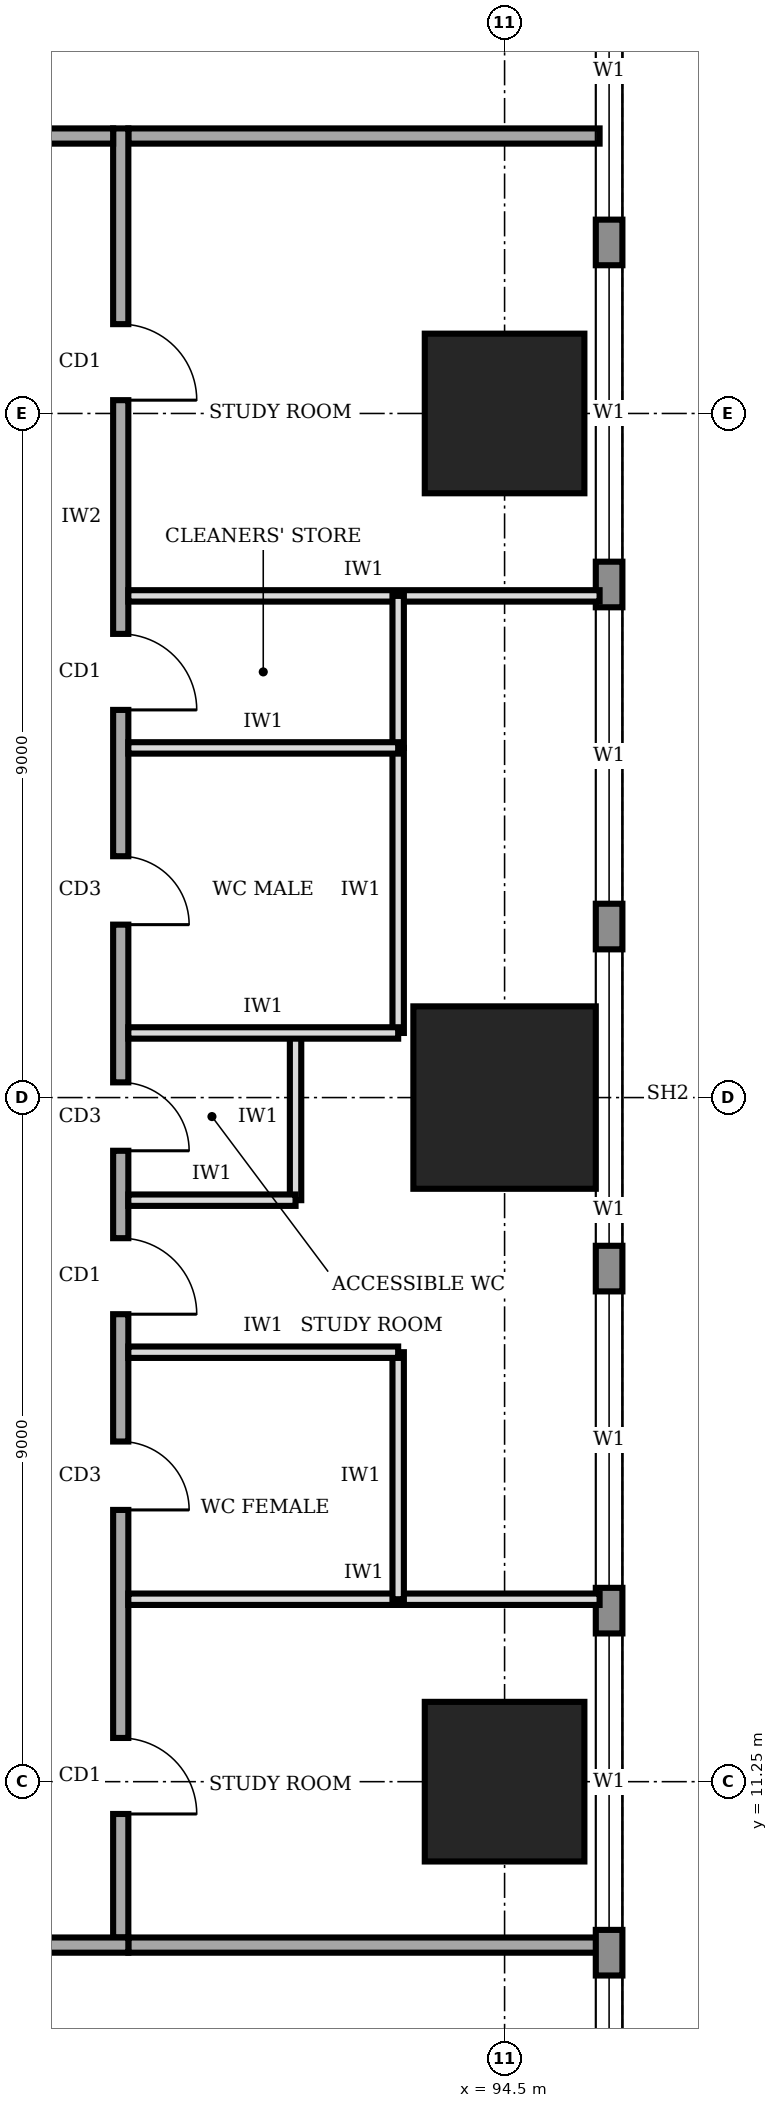
"""IFC4 building model, lengths in metres.
Left out: names, types, materials, properties, quantities, classifications, styles, units other than length and angle.
Written with IfcOpenShell. Run it as: python <this file> out.ifc"""

import sys

from ifc_helpers import new_model, si_unit, direction, frame, frame_2d, origin, origin_2d, place, context, subcontext, project, spatial, rectangle, extrude, element, fill, save


model = new_model("IFC4")
c1 = context("Model", 3, precision=1e-05, world=origin(), true_north=direction((0.0, 1.0)))
c2 = subcontext(c1, "Body", "Model", "MODEL_VIEW")
j1 = project(units=[si_unit("LENGTHUNIT", "METRE"), si_unit("PLANEANGLEUNIT", "RADIAN")], contexts=[c1])
p1 = place(None, origin())
s1 = spatial("IfcSite", under=j1, at=p1, CompositionType="ELEMENT")
p2 = place(p1, origin())
s2 = spatial("IfcBuilding", under=s1, at=p2, CompositionType="ELEMENT")
p3 = place(p2, frame((0.0, 0.0, 113.0)))
s3 = spatial("IfcBuildingStorey", under=s2, at=p3, CompositionType="ELEMENT", Elevation=113.0)
p4 = place(p3, frame((94.5, 11.25, 0.0), z_axis=(0.0, 0.0, 1.0), x_axis=(1.0, 0.0, 0.0)))
e1 = element("IfcColumn", 1, at=p4, inside=s3, PredefinedType="COLUMN", context=c2, shape_type="SweptSolid", body=[
    extrude(rectangle(XDim=2.1, YDim=2.1, at=origin_2d()), origin(), (0.0, 0.0, 1.0), 4.0),
])
p5 = place(p3, frame((94.5, 20.25, 0.0), z_axis=(0.0, 0.0, 1.0), x_axis=(1.0, 0.0, 0.0)))
e2 = element("IfcColumn", 2, at=p5, inside=s3, PredefinedType="COLUMN", context=c2, shape_type="SweptSolid", body=[
    extrude(rectangle(XDim=2.4, YDim=2.4, at=origin_2d()), origin(), (0.0, 0.0, 1.0), 4.0),
])
p6 = place(p3, frame((94.5, 29.25, 0.0), z_axis=(0.0, 0.0, 1.0), x_axis=(1.0, 0.0, 0.0)))
e3 = element("IfcColumn", 3, at=p6, inside=s3, PredefinedType="COLUMN", context=c2, shape_type="SweptSolid", body=[
    extrude(rectangle(XDim=2.1, YDim=2.1, at=origin_2d()), origin(), (0.0, 0.0, 1.0), 4.0),
])
p7 = place(p3, frame((95.875, 3.32, 0.0), z_axis=(0.0, 0.0, 1.0), x_axis=(0.0, 1.0, 0.0)))
e4 = element("IfcWall", 4, at=p7, inside=s3, PredefinedType="STANDARD", context=c2, shape_type="SweptSolid", body=[
    extrude(rectangle(XDim=33.96, YDim=0.35, at=frame_2d((16.98, 0.0))), origin(), (0.0, 0.0, 1.0), 3.75),
])
p8 = place(p7, frame((1.48, 0.0, 0.9)))
e5 = element("IfcOpeningElement", 5, at=p8, cuts=e4, PredefinedType="OPENING", context=c2, shape_type="SweptSolid", body=[
    extrude(rectangle(XDim=3.9, YDim=2.2, at=frame_2d((1.95, 1.1))), frame((0.0, 0.185, 0.0), z_axis=(0.0, -1.0, 0.0), x_axis=(1.0, 0.0, 0.0)), (0.0, 0.0, 1.0), 0.37),
])
p9 = place(p7, frame((5.98, 0.0, 0.9)))
e6 = element("IfcOpeningElement", 6, at=p9, cuts=e4, PredefinedType="OPENING", context=c2, shape_type="SweptSolid", body=[
    extrude(rectangle(XDim=3.9, YDim=2.2, at=frame_2d((1.95, 1.1))), frame((0.0, 0.185, 0.0), z_axis=(0.0, -1.0, 0.0), x_axis=(1.0, 0.0, 0.0)), (0.0, 0.0, 1.0), 0.37),
])
p10 = place(p7, frame((10.48, 0.0, 0.9)))
e7 = element("IfcOpeningElement", 7, at=p10, cuts=e4, PredefinedType="OPENING", context=c2, shape_type="SweptSolid", body=[
    extrude(rectangle(XDim=3.9, YDim=2.2, at=frame_2d((1.95, 1.1))), frame((0.0, 0.185, 0.0), z_axis=(0.0, -1.0, 0.0), x_axis=(1.0, 0.0, 0.0)), (0.0, 0.0, 1.0), 0.37),
])
p11 = place(p7, frame((14.98, 0.0, 0.9)))
e8 = element("IfcOpeningElement", 8, at=p11, cuts=e4, PredefinedType="OPENING", context=c2, shape_type="SweptSolid", body=[
    extrude(rectangle(XDim=3.9, YDim=2.2, at=frame_2d((1.95, 1.1))), frame((0.0, 0.185, 0.0), z_axis=(0.0, -1.0, 0.0), x_axis=(1.0, 0.0, 0.0)), (0.0, 0.0, 1.0), 0.37),
])
p12 = place(p7, frame((19.48, 0.0, 0.9)))
e9 = element("IfcOpeningElement", 9, at=p12, cuts=e4, PredefinedType="OPENING", context=c2, shape_type="SweptSolid", body=[
    extrude(rectangle(XDim=3.9, YDim=2.2, at=frame_2d((1.95, 1.1))), frame((0.0, 0.185, 0.0), z_axis=(0.0, -1.0, 0.0), x_axis=(1.0, 0.0, 0.0)), (0.0, 0.0, 1.0), 0.37),
])
p13 = place(p7, frame((23.98, 0.0, 0.9)))
e10 = element("IfcOpeningElement", 10, at=p13, cuts=e4, PredefinedType="OPENING", context=c2, shape_type="SweptSolid", body=[
    extrude(rectangle(XDim=3.9, YDim=2.2, at=frame_2d((1.95, 1.1))), frame((0.0, 0.185, 0.0), z_axis=(0.0, -1.0, 0.0), x_axis=(1.0, 0.0, 0.0)), (0.0, 0.0, 1.0), 0.37),
])
p14 = place(p7, frame((28.48, 0.0, 0.9)))
e11 = element("IfcOpeningElement", 11, at=p14, cuts=e4, PredefinedType="OPENING", context=c2, shape_type="SweptSolid", body=[
    extrude(rectangle(XDim=3.9, YDim=2.2, at=frame_2d((1.95, 1.1))), frame((0.0, 0.185, 0.0), z_axis=(0.0, -1.0, 0.0), x_axis=(1.0, 0.0, 0.0)), (0.0, 0.0, 1.0), 0.37),
])
p15 = place(p3, frame((72.65, 9.1, 0.0), z_axis=(0.0, 0.0, 1.0), x_axis=(1.0, 0.0, 0.0)))
e12 = element("IfcWall", 12, at=p15, inside=s3, PredefinedType="SOLIDWALL", context=c2, shape_type="SweptSolid", body=[
    extrude(rectangle(XDim=16.9, YDim=0.2, at=frame_2d((8.45, 0.0))), origin(), (0.0, 0.0, 1.0), 3.75),
])
p16 = place(p15, frame((1.325, 0.0, 0.0)))
e13 = element("IfcOpeningElement", 13, at=p16, cuts=e12, PredefinedType="OPENING", context=c2, shape_type="SweptSolid", body=[
    extrude(rectangle(XDim=1.0, YDim=2.1, at=frame_2d((0.5, 1.05))), frame((0.0, 0.11, 0.0), z_axis=(0.0, -1.0, 0.0), x_axis=(1.0, 0.0, 0.0)), (0.0, 0.0, 1.0), 0.22),
])
p17 = place(p15, frame((7.85, 0.0, 0.0)))
e14 = element("IfcOpeningElement", 14, at=p17, cuts=e12, PredefinedType="OPENING", context=c2, shape_type="SweptSolid", body=[
    extrude(rectangle(XDim=1.0, YDim=2.1, at=frame_2d((0.5, 1.05))), frame((0.0, 0.11, 0.0), z_axis=(0.0, -1.0, 0.0), x_axis=(1.0, 0.0, 0.0)), (0.0, 0.0, 1.0), 0.22),
])
p18 = place(p15, frame((14.375, 0.0, 0.0)))
e15 = element("IfcOpeningElement", 15, at=p18, cuts=e12, PredefinedType="OPENING", context=c2, shape_type="SweptSolid", body=[
    extrude(rectangle(XDim=1.0, YDim=2.1, at=frame_2d((0.5, 1.05))), frame((0.0, 0.11, 0.0), z_axis=(0.0, -1.0, 0.0), x_axis=(1.0, 0.0, 0.0)), (0.0, 0.0, 1.0), 0.22),
])
p19 = place(p3, frame((89.45, 9.2, 0.0), z_axis=(0.0, 0.0, 1.0), x_axis=(0.0, 1.0, 0.0)))
e16 = element("IfcWall", 16, at=p19, inside=s3, PredefinedType="SOLIDWALL", context=c2, shape_type="SweptSolid", body=[
    extrude(rectangle(XDim=23.8, YDim=0.2, at=frame_2d((11.9, 0.0))), origin(), (0.0, 0.0, 1.0), 3.75),
])
p20 = place(p19, frame((1.625, 0.0, 0.0)))
e17 = element("IfcOpeningElement", 17, at=p20, cuts=e16, PredefinedType="OPENING", context=c2, shape_type="SweptSolid", body=[
    extrude(rectangle(XDim=1.0, YDim=2.1, at=frame_2d((0.5, 1.05))), frame((0.0, 0.11, 0.0), z_axis=(0.0, -1.0, 0.0), x_axis=(1.0, 0.0, 0.0)), (0.0, 0.0, 1.0), 0.22),
])
p21 = place(p19, frame((5.625, 0.0, 0.0)))
e18 = element("IfcOpeningElement", 18, at=p21, cuts=e16, PredefinedType="OPENING", context=c2, shape_type="SweptSolid", body=[
    extrude(rectangle(XDim=0.9, YDim=2.1, at=frame_2d((0.45, 1.05))), frame((0.0, 0.11, 0.0), z_axis=(0.0, -1.0, 0.0), x_axis=(1.0, 0.0, 0.0)), (0.0, 0.0, 1.0), 0.22),
])
p22 = place(p19, frame((10.35, 0.0, 0.0)))
e19 = element("IfcOpeningElement", 19, at=p22, cuts=e16, PredefinedType="OPENING", context=c2, shape_type="SweptSolid", body=[
    extrude(rectangle(XDim=0.9, YDim=2.1, at=frame_2d((0.45, 1.05))), frame((0.0, 0.11, 0.0), z_axis=(0.0, -1.0, 0.0), x_axis=(1.0, 0.0, 0.0)), (0.0, 0.0, 1.0), 0.22),
])
p23 = place(p19, frame((13.325, 0.0, 0.0)))
e20 = element("IfcOpeningElement", 20, at=p23, cuts=e16, PredefinedType="OPENING", context=c2, shape_type="SweptSolid", body=[
    extrude(rectangle(XDim=0.9, YDim=2.1, at=frame_2d((0.45, 1.05))), frame((0.0, 0.11, 0.0), z_axis=(0.0, -1.0, 0.0), x_axis=(1.0, 0.0, 0.0)), (0.0, 0.0, 1.0), 0.22),
])
p24 = place(p19, frame((16.15, 0.0, 0.0)))
e21 = element("IfcOpeningElement", 21, at=p24, cuts=e16, PredefinedType="OPENING", context=c2, shape_type="SweptSolid", body=[
    extrude(rectangle(XDim=1.0, YDim=2.1, at=frame_2d((0.5, 1.05))), frame((0.0, 0.11, 0.0), z_axis=(0.0, -1.0, 0.0), x_axis=(1.0, 0.0, 0.0)), (0.0, 0.0, 1.0), 0.22),
])
p25 = place(p19, frame((8.2, 0.0, 0.0)))
e22 = element("IfcOpeningElement", 22, at=p25, cuts=e16, PredefinedType="OPENING", context=c2, shape_type="SweptSolid", body=[
    extrude(rectangle(XDim=1.0, YDim=2.1, at=frame_2d((0.5, 1.05))), frame((0.0, 0.11, 0.0), z_axis=(0.0, -1.0, 0.0), x_axis=(1.0, 0.0, 0.0)), (0.0, 0.0, 1.0), 0.22),
])
p26 = place(p19, frame((20.225, 0.0, 0.0)))
e23 = element("IfcOpeningElement", 23, at=p26, cuts=e16, PredefinedType="OPENING", context=c2, shape_type="SweptSolid", body=[
    extrude(rectangle(XDim=1.0, YDim=2.1, at=frame_2d((0.5, 1.05))), frame((0.0, 0.11, 0.0), z_axis=(0.0, -1.0, 0.0), x_axis=(1.0, 0.0, 0.0)), (0.0, 0.0, 1.0), 0.22),
])
p27 = place(p3, frame((89.35, 32.9, 0.0), z_axis=(0.0, 0.0, 1.0), x_axis=(-1.0, 0.0, 0.0)))
e24 = element("IfcWall", 24, at=p27, inside=s3, PredefinedType="SOLIDWALL", context=c2, shape_type="SweptSolid", body=[
    extrude(rectangle(XDim=16.9, YDim=0.2, at=frame_2d((8.45, 0.0))), origin(), (0.0, 0.0, 1.0), 3.75),
])
p28 = place(p27, frame((14.375, 0.0, 0.0)))
e25 = element("IfcOpeningElement", 25, at=p28, cuts=e24, PredefinedType="OPENING", context=c2, shape_type="SweptSolid", body=[
    extrude(rectangle(XDim=1.0, YDim=2.1, at=frame_2d((0.5, 1.05))), frame((0.0, 0.11, 0.0), z_axis=(0.0, -1.0, 0.0), x_axis=(1.0, 0.0, 0.0)), (0.0, 0.0, 1.0), 0.22),
])
p29 = place(p27, frame((7.85, 0.0, 0.0)))
e26 = element("IfcOpeningElement", 26, at=p29, cuts=e24, PredefinedType="OPENING", context=c2, shape_type="SweptSolid", body=[
    extrude(rectangle(XDim=1.0, YDim=2.1, at=frame_2d((0.5, 1.05))), frame((0.0, 0.11, 0.0), z_axis=(0.0, -1.0, 0.0), x_axis=(1.0, 0.0, 0.0)), (0.0, 0.0, 1.0), 0.22),
])
p30 = place(p27, frame((1.325, 0.0, 0.0)))
e27 = element("IfcOpeningElement", 27, at=p30, cuts=e24, PredefinedType="OPENING", context=c2, shape_type="SweptSolid", body=[
    extrude(rectangle(XDim=1.0, YDim=2.1, at=frame_2d((0.5, 1.05))), frame((0.0, 0.11, 0.0), z_axis=(0.0, -1.0, 0.0), x_axis=(1.0, 0.0, 0.0)), (0.0, 0.0, 1.0), 0.22),
])
for number, where, z_axis, x_axis in (
    (28, (89.55, 9.1, 0.0), (0.0, 0.0, 1.0), (1.0, 0.0, 0.0)),
    (29, (89.55, 32.9, 0.0), (0.0, 0.0, 1.0), (1.0, 0.0, 0.0)),
):
    element("IfcWall", number, at=place(p3, frame(where, z_axis=z_axis, x_axis=x_axis)), inside=s3, PredefinedType="SOLIDWALL", context=c2, shape_type="SweptSolid", body=[
        extrude(rectangle(XDim=6.2, YDim=0.2, at=frame_2d((3.1, 0.0))), origin(), (0.0, 0.0, 1.0), 3.75),
    ])
for number, where, z_axis, x_axis in (
    (30, (89.55, 13.65, 0.0), (0.0, 0.0, 1.0), (1.0, 0.0, 0.0)),
    (31, (89.55, 26.85, 0.0), (0.0, 0.0, 1.0), (1.0, 0.0, 0.0)),
):
    element("IfcWall", number, at=place(p3, frame(where, z_axis=z_axis, x_axis=x_axis)), inside=s3, PredefinedType="PARTITIONING", context=c2, shape_type="SweptSolid", body=[
        extrude(rectangle(XDim=6.2, YDim=0.15, at=frame_2d((3.1, 0.0))), origin(), (0.0, 0.0, 1.0), 3.75),
    ])
p31 = place(p3, frame((89.55, 16.9, 0.0), z_axis=(0.0, 0.0, 1.0), x_axis=(1.0, 0.0, 0.0)))
e32 = element("IfcWall", 32, at=p31, inside=s3, PredefinedType="PARTITIONING", context=c2, shape_type="SweptSolid", body=[
    extrude(rectangle(XDim=3.55, YDim=0.15, at=frame_2d((1.775, 0.0))), origin(), (0.0, 0.0, 1.0), 3.75),
])
p32 = place(p3, frame((89.55, 18.9, 0.0), z_axis=(0.0, 0.0, 1.0), x_axis=(1.0, 0.0, 0.0)))
e33 = element("IfcWall", 33, at=p32, inside=s3, PredefinedType="PARTITIONING", context=c2, shape_type="SweptSolid", body=[
    extrude(rectangle(XDim=2.2, YDim=0.15, at=frame_2d((1.1, 0.0))), origin(), (0.0, 0.0, 1.0), 3.75),
])
p33 = place(p3, frame((89.55, 21.1, 0.0), z_axis=(0.0, 0.0, 1.0), x_axis=(1.0, 0.0, 0.0)))
e34 = element("IfcWall", 34, at=p33, inside=s3, PredefinedType="PARTITIONING", context=c2, shape_type="SweptSolid", body=[
    extrude(rectangle(XDim=3.55, YDim=0.15, at=frame_2d((1.775, 0.0))), origin(), (0.0, 0.0, 1.0), 2.85),
])
p34 = place(p3, frame((89.55, 24.85, 0.0), z_axis=(0.0, 0.0, 1.0), x_axis=(1.0, 0.0, 0.0)))
e35 = element("IfcWall", 35, at=p34, inside=s3, PredefinedType="PARTITIONING", context=c2, shape_type="SweptSolid", body=[
    extrude(rectangle(XDim=3.55, YDim=0.15, at=frame_2d((1.775, 0.0))), origin(), (0.0, 0.0, 1.0), 3.75),
])
p35 = place(p3, frame((93.1, 13.65, 0.0), z_axis=(0.0, 0.0, 1.0), x_axis=(0.0, 1.0, 0.0)))
e36 = element("IfcWall", 36, at=p35, inside=s3, PredefinedType="PARTITIONING", context=c2, shape_type="SweptSolid", body=[
    extrude(rectangle(XDim=3.25, YDim=0.15, at=frame_2d((1.625, 0.0))), origin(), (0.0, 0.0, 1.0), 3.75),
])
p36 = place(p3, frame((91.75, 18.9, 0.0), z_axis=(0.0, 0.0, 1.0), x_axis=(0.0, 1.0, 0.0)))
e37 = element("IfcWall", 37, at=p36, inside=s3, PredefinedType="PARTITIONING", context=c2, shape_type="SweptSolid", body=[
    extrude(rectangle(XDim=2.2, YDim=0.15, at=frame_2d((1.1, 0.0))), origin(), (0.0, 0.0, 1.0), 3.75),
])
p37 = place(p3, frame((93.1, 21.1, 0.0), z_axis=(0.0, 0.0, 1.0), x_axis=(0.0, 1.0, 0.0)))
e38 = element("IfcWall", 38, at=p37, inside=s3, PredefinedType="PARTITIONING", context=c2, shape_type="SweptSolid", body=[
    extrude(rectangle(XDim=3.75, YDim=0.15, at=frame_2d((1.875, 0.0))), origin(), (0.0, 0.0, 1.0), 3.75),
])
p38 = place(p3, frame((93.1, 24.85, 0.0), z_axis=(0.0, 0.0, 1.0), x_axis=(0.0, 1.0, 0.0)))
e39 = element("IfcWall", 39, at=p38, inside=s3, PredefinedType="PARTITIONING", context=c2, shape_type="SweptSolid", body=[
    extrude(rectangle(XDim=2.0, YDim=0.15, at=frame_2d((1.0, 0.0))), origin(), (0.0, 0.0, 1.0), 3.75),
])
p39 = place(p8, origin())
e40 = element("IfcWindow", 40, at=p39, inside=s3, PartitioningType="SINGLE_PANEL", PredefinedType="WINDOW", context=c2, shape_type="SweptSolid", body=[
    extrude(rectangle(XDim=3.9, YDim=2.2, at=frame_2d((1.95, 1.1))), frame((0.0, 0.03, 0.0), z_axis=(0.0, -1.0, 0.0), x_axis=(1.0, 0.0, 0.0)), (0.0, 0.0, 1.0), 0.06),
])
fill(e5, e40)
p40 = place(p9, origin())
e41 = element("IfcWindow", 41, at=p40, inside=s3, PartitioningType="SINGLE_PANEL", PredefinedType="WINDOW", context=c2, shape_type="SweptSolid", body=[
    extrude(rectangle(XDim=3.9, YDim=2.2, at=frame_2d((1.95, 1.1))), frame((0.0, 0.03, 0.0), z_axis=(0.0, -1.0, 0.0), x_axis=(1.0, 0.0, 0.0)), (0.0, 0.0, 1.0), 0.06),
])
fill(e6, e41)
p41 = place(p10, origin())
e42 = element("IfcWindow", 42, at=p41, inside=s3, PartitioningType="SINGLE_PANEL", PredefinedType="WINDOW", context=c2, shape_type="SweptSolid", body=[
    extrude(rectangle(XDim=3.9, YDim=2.2, at=frame_2d((1.95, 1.1))), frame((0.0, 0.03, 0.0), z_axis=(0.0, -1.0, 0.0), x_axis=(1.0, 0.0, 0.0)), (0.0, 0.0, 1.0), 0.06),
])
fill(e7, e42)
p42 = place(p11, origin())
e43 = element("IfcWindow", 43, at=p42, inside=s3, PartitioningType="SINGLE_PANEL", PredefinedType="WINDOW", context=c2, shape_type="SweptSolid", body=[
    extrude(rectangle(XDim=3.9, YDim=2.2, at=frame_2d((1.95, 1.1))), frame((0.0, 0.03, 0.0), z_axis=(0.0, -1.0, 0.0), x_axis=(1.0, 0.0, 0.0)), (0.0, 0.0, 1.0), 0.06),
])
fill(e8, e43)
p43 = place(p12, origin())
e44 = element("IfcWindow", 44, at=p43, inside=s3, PartitioningType="SINGLE_PANEL", PredefinedType="WINDOW", context=c2, shape_type="SweptSolid", body=[
    extrude(rectangle(XDim=3.9, YDim=2.2, at=frame_2d((1.95, 1.1))), frame((0.0, 0.03, 0.0), z_axis=(0.0, -1.0, 0.0), x_axis=(1.0, 0.0, 0.0)), (0.0, 0.0, 1.0), 0.06),
])
fill(e9, e44)
p44 = place(p13, origin())
e45 = element("IfcWindow", 45, at=p44, inside=s3, PartitioningType="SINGLE_PANEL", PredefinedType="WINDOW", context=c2, shape_type="SweptSolid", body=[
    extrude(rectangle(XDim=3.9, YDim=2.2, at=frame_2d((1.95, 1.1))), frame((0.0, 0.03, 0.0), z_axis=(0.0, -1.0, 0.0), x_axis=(1.0, 0.0, 0.0)), (0.0, 0.0, 1.0), 0.06),
])
fill(e10, e45)
p45 = place(p14, origin())
e46 = element("IfcWindow", 46, at=p45, inside=s3, PartitioningType="SINGLE_PANEL", PredefinedType="WINDOW", context=c2, shape_type="SweptSolid", body=[
    extrude(rectangle(XDim=3.9, YDim=2.2, at=frame_2d((1.95, 1.1))), frame((0.0, 0.03, 0.0), z_axis=(0.0, -1.0, 0.0), x_axis=(1.0, 0.0, 0.0)), (0.0, 0.0, 1.0), 0.06),
])
fill(e11, e46)
p46 = place(p20, frame((1.0, 0.0, 0.0), z_axis=(0.0, 0.0, 1.0), x_axis=(-1.0, 0.0, 0.0)))
e47 = element("IfcDoor", 47, at=p46, inside=s3, OperationType="SINGLE_SWING_RIGHT", PredefinedType="DOOR", context=c2, shape_type="SweptSolid", body=[
    extrude(rectangle(XDim=1.0, YDim=2.1, at=frame_2d((0.5, 1.05))), frame((0.0, 0.025, 0.0), z_axis=(0.0, -1.0, 0.0), x_axis=(1.0, 0.0, 0.0)), (0.0, 0.0, 1.0), 0.05),
])
fill(e17, e47)
p47 = place(p21, frame((0.9, 0.0, 0.0), z_axis=(0.0, 0.0, 1.0), x_axis=(-1.0, 0.0, 0.0)))
e48 = element("IfcDoor", 48, at=p47, inside=s3, OperationType="SINGLE_SWING_RIGHT", PredefinedType="DOOR", context=c2, shape_type="SweptSolid", body=[
    extrude(rectangle(XDim=0.9, YDim=2.1, at=frame_2d((0.45, 1.05))), frame((0.0, 0.025, 0.0), z_axis=(0.0, -1.0, 0.0), x_axis=(1.0, 0.0, 0.0)), (0.0, 0.0, 1.0), 0.05),
])
fill(e18, e48)
p48 = place(p22, frame((0.9, 0.0, 0.0), z_axis=(0.0, 0.0, 1.0), x_axis=(-1.0, 0.0, 0.0)))
e49 = element("IfcDoor", 49, at=p48, inside=s3, OperationType="SINGLE_SWING_RIGHT", PredefinedType="DOOR", context=c2, shape_type="SweptSolid", body=[
    extrude(rectangle(XDim=0.9, YDim=2.1, at=frame_2d((0.45, 1.05))), frame((0.0, 0.025, 0.0), z_axis=(0.0, -1.0, 0.0), x_axis=(1.0, 0.0, 0.0)), (0.0, 0.0, 1.0), 0.05),
])
fill(e19, e49)
p49 = place(p23, frame((0.9, 0.0, 0.0), z_axis=(0.0, 0.0, 1.0), x_axis=(-1.0, 0.0, 0.0)))
e50 = element("IfcDoor", 50, at=p49, inside=s3, OperationType="SINGLE_SWING_RIGHT", PredefinedType="DOOR", context=c2, shape_type="SweptSolid", body=[
    extrude(rectangle(XDim=0.9, YDim=2.1, at=frame_2d((0.45, 1.05))), frame((0.0, 0.025, 0.0), z_axis=(0.0, -1.0, 0.0), x_axis=(1.0, 0.0, 0.0)), (0.0, 0.0, 1.0), 0.05),
])
fill(e20, e50)
p50 = place(p24, frame((1.0, 0.0, 0.0), z_axis=(0.0, 0.0, 1.0), x_axis=(-1.0, 0.0, 0.0)))
e51 = element("IfcDoor", 51, at=p50, inside=s3, OperationType="SINGLE_SWING_RIGHT", PredefinedType="DOOR", context=c2, shape_type="SweptSolid", body=[
    extrude(rectangle(XDim=1.0, YDim=2.1, at=frame_2d((0.5, 1.05))), frame((0.0, 0.025, 0.0), z_axis=(0.0, -1.0, 0.0), x_axis=(1.0, 0.0, 0.0)), (0.0, 0.0, 1.0), 0.05),
])
fill(e21, e51)
p51 = place(p25, frame((1.0, 0.0, 0.0), z_axis=(0.0, 0.0, 1.0), x_axis=(-1.0, 0.0, 0.0)))
e52 = element("IfcDoor", 52, at=p51, inside=s3, OperationType="SINGLE_SWING_RIGHT", PredefinedType="DOOR", context=c2, shape_type="SweptSolid", body=[
    extrude(rectangle(XDim=1.0, YDim=2.1, at=frame_2d((0.5, 1.05))), frame((0.0, 0.025, 0.0), z_axis=(0.0, -1.0, 0.0), x_axis=(1.0, 0.0, 0.0)), (0.0, 0.0, 1.0), 0.05),
])
fill(e22, e52)
p52 = place(p26, frame((1.0, 0.0, 0.0), z_axis=(0.0, 0.0, 1.0), x_axis=(-1.0, 0.0, 0.0)))
e53 = element("IfcDoor", 53, at=p52, inside=s3, OperationType="SINGLE_SWING_RIGHT", PredefinedType="DOOR", context=c2, shape_type="SweptSolid", body=[
    extrude(rectangle(XDim=1.0, YDim=2.1, at=frame_2d((0.5, 1.05))), frame((0.0, 0.025, 0.0), z_axis=(0.0, -1.0, 0.0), x_axis=(1.0, 0.0, 0.0)), (0.0, 0.0, 1.0), 0.05),
])
fill(e23, e53)
save(model, sys.argv[1])
